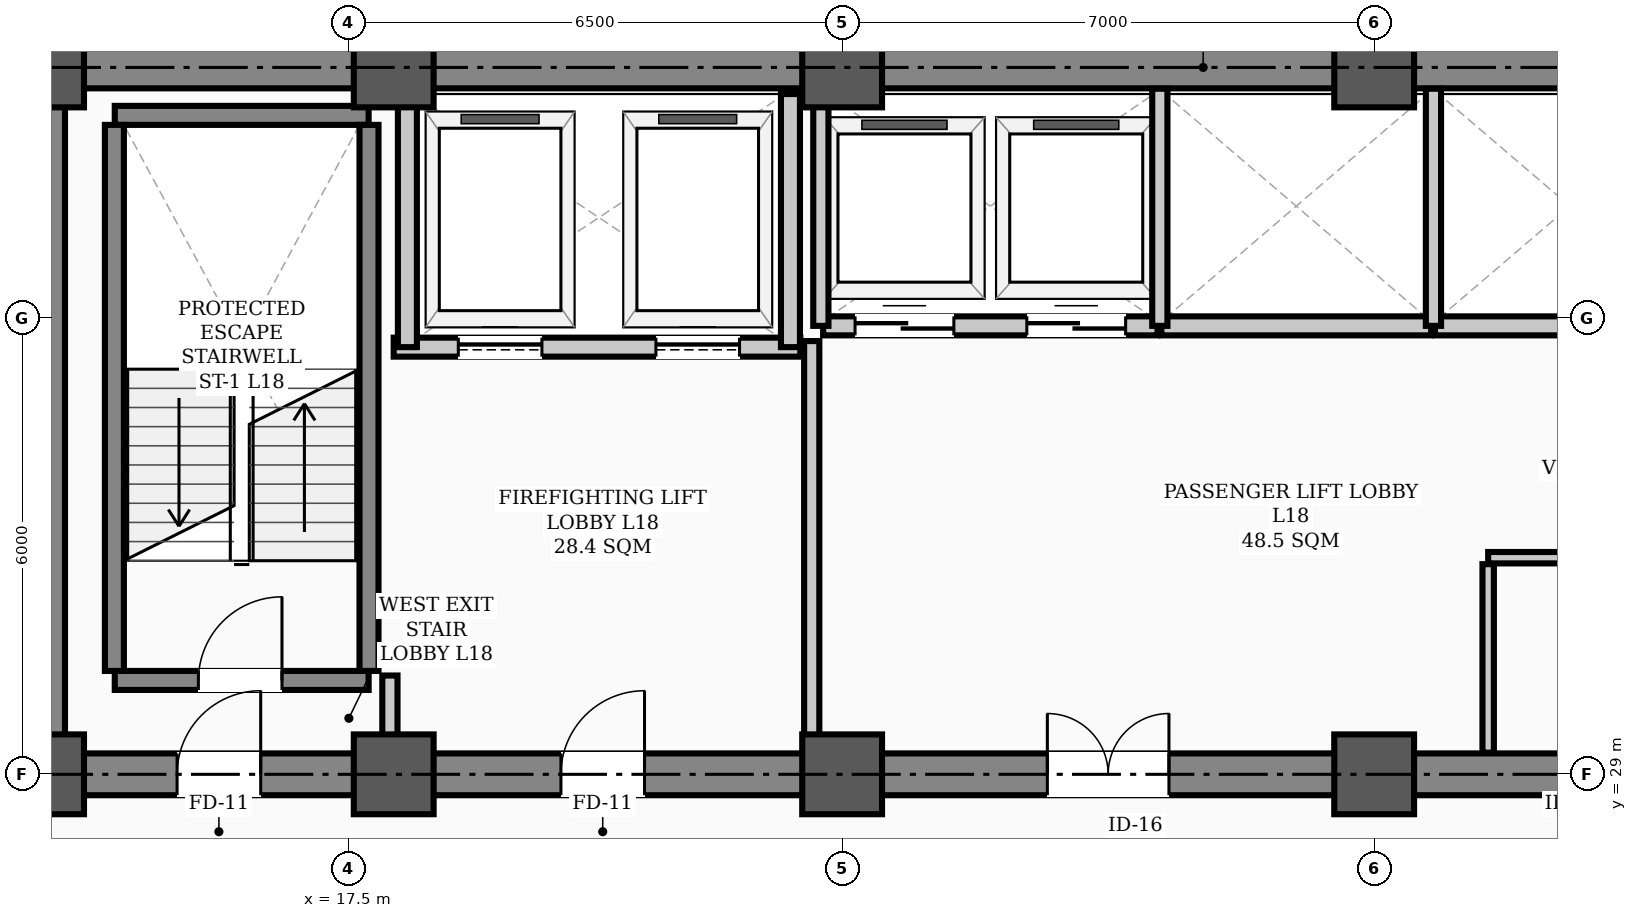
"""IFC4 building model, lengths in metres.
Left out: names, types, materials, properties, quantities, classifications, styles, units other than length and angle.
Written with IfcOpenShell. Run it as: python <this file> out.ifc"""

import sys

from ifc_helpers import new_model, si_unit, direction, frame, frame_2d, origin, origin_2d, place, context, subcontext, project, spatial, rectangle, hollow_rectangle, extrude, element, fill, save


model = new_model("IFC4")
c1 = context("Model", 3, precision=1e-05, world=origin(), true_north=direction((0.0, 1.0)))
c2 = subcontext(c1, "Body", "Model", "MODEL_VIEW")
j1 = project(units=[si_unit("LENGTHUNIT", "METRE"), si_unit("PLANEANGLEUNIT", "RADIAN")], contexts=[c1])
p1 = place(None, origin())
s1 = spatial("IfcSite", under=j1, at=p1, CompositionType="ELEMENT")
p2 = place(p1, origin())
s2 = spatial("IfcBuilding", under=s1, at=p2, CompositionType="ELEMENT")
p3 = place(p2, frame((0.0, 0.0, 73.3)))
s3 = spatial("IfcBuildingStorey", under=s2, at=p3, CompositionType="ELEMENT", Elevation=73.3)
for number, where, z_axis, x_axis in (
    (1, (13.5, 29.0, 0.0), (0.0, 0.0, 1.0), (1.0, 0.0, 0.0)),
    (2, (13.5, 38.3, 0.0), (0.0, 0.0, 1.0), (1.0, 0.0, 0.0)),
    (3, (18.1, 29.0, 0.0), (0.0, 0.0, 1.0), (1.0, 0.0, 0.0)),
    (4, (18.1, 38.3, 0.0), (0.0, 0.0, 1.0), (1.0, 0.0, 0.0)),
    (5, (24.0, 29.0, 0.0), (0.0, 0.0, 1.0), (1.0, 0.0, 0.0)),
    (6, (24.0, 38.3, 0.0), (0.0, 0.0, 1.0), (1.0, 0.0, 0.0)),
    (7, (31.0, 29.0, 0.0), (0.0, 0.0, 1.0), (1.0, 0.0, 0.0)),
    (8, (31.0, 38.3, 0.0), (0.0, 0.0, 1.0), (1.0, 0.0, 0.0)),
):
    element("IfcColumn", number, at=place(p3, frame(where, z_axis=z_axis, x_axis=x_axis)), inside=s3, PredefinedType="COLUMN", context=c2, shape_type="SweptSolid", body=[
        extrude(hollow_rectangle(XDim=1.05, YDim=1.05, WallThickness=0.038, InnerFilletRadius=0.019, OuterFilletRadius=0.057, at=origin_2d()), origin(), (0.0, 0.0, 1.0), 3.9),
    ])
p4 = place(p3, frame((13.5, 29.0, 0.0), z_axis=(0.0, 0.0, 1.0), x_axis=(1.0, 0.0, 0.0)))
e9 = element("IfcWall", 9, at=p4, inside=s3, PredefinedType="SHEAR", context=c2, shape_type="SweptSolid", body=[
    extrude(rectangle(XDim=30.5, YDim=0.55, at=frame_2d((15.25, 0.0))), origin(), (0.0, 0.0, 1.0), 3.72),
])
p5 = place(p4, frame((1.75, 0.0, 0.0)))
e10 = element("IfcOpeningElement", 10, at=p5, cuts=e9, PredefinedType="OPENING", context=c2, shape_type="SweptSolid", body=[
    extrude(rectangle(XDim=1.1, YDim=2.08, at=frame_2d((0.55, 1.04))), frame((0.0, 0.285, 0.0), z_axis=(0.0, -1.0, 0.0), x_axis=(1.0, 0.0, 0.0)), (0.0, 0.0, 1.0), 0.57),
])
p6 = place(p4, frame((26.7, 0.0, 0.0)))
e11 = element("IfcOpeningElement", 11, at=p6, cuts=e9, PredefinedType="OPENING", context=c2, shape_type="SweptSolid", body=[
    extrude(rectangle(XDim=1.1, YDim=2.08, at=frame_2d((0.55, 1.04))), frame((0.0, 0.285, 0.0), z_axis=(0.0, -1.0, 0.0), x_axis=(1.0, 0.0, 0.0)), (0.0, 0.0, 1.0), 0.57),
])
p7 = place(p4, frame((6.8, 0.0, 0.0)))
e12 = element("IfcOpeningElement", 12, at=p7, cuts=e9, PredefinedType="OPENING", context=c2, shape_type="SweptSolid", body=[
    extrude(rectangle(XDim=1.1, YDim=2.08, at=frame_2d((0.55, 1.04))), frame((0.0, 0.285, 0.0), z_axis=(0.0, -1.0, 0.0), x_axis=(1.0, 0.0, 0.0)), (0.0, 0.0, 1.0), 0.57),
])
p8 = place(p4, frame((13.2, 0.0, 0.0)))
e13 = element("IfcOpeningElement", 13, at=p8, cuts=e9, PredefinedType="OPENING", context=c2, shape_type="SweptSolid", body=[
    extrude(rectangle(XDim=1.6, YDim=2.08, at=frame_2d((0.8, 1.04))), frame((0.0, 0.285, 0.0), z_axis=(0.0, -1.0, 0.0), x_axis=(1.0, 0.0, 0.0)), (0.0, 0.0, 1.0), 0.57),
])
p9 = place(p4, frame((20.525, 0.0, 0.0)))
e14 = element("IfcOpeningElement", 14, at=p9, cuts=e9, PredefinedType="OPENING", context=c2, shape_type="SweptSolid", body=[
    extrude(rectangle(XDim=0.95, YDim=2.08, at=frame_2d((0.475, 1.04))), frame((0.0, 0.285, 0.0), z_axis=(0.0, -1.0, 0.0), x_axis=(1.0, 0.0, 0.0)), (0.0, 0.0, 1.0), 0.57),
])
p10 = place(p3, frame((13.5, 38.3, 0.0), z_axis=(0.0, 0.0, 1.0), x_axis=(1.0, 0.0, 0.0)))
e15 = element("IfcWall", 15, at=p10, inside=s3, PredefinedType="SHEAR", context=c2, shape_type="SweptSolid", body=[
    extrude(rectangle(XDim=30.5, YDim=0.55, at=frame_2d((15.25, 0.0))), origin(), (0.0, 0.0, 1.0), 3.72),
])
p11 = place(p3, frame((13.5, 29.35, 0.0), z_axis=(0.0, 0.0, 1.0), x_axis=(0.0, 1.0, 0.0)))
e16 = element("IfcWall", 16, at=p11, inside=s3, PredefinedType="SHEAR", context=c2, shape_type="SweptSolid", body=[
    extrude(rectangle(XDim=8.6, YDim=0.55, at=frame_2d((4.3, 0.0))), origin(), (0.0, 0.0, 1.0), 3.72),
])
p12 = place(p3, frame((14.43, 30.235, 0.0), z_axis=(0.0, 0.0, 1.0), x_axis=(1.0, 0.0, 0.0)))
e17 = element("IfcWall", 17, at=p12, inside=s3, PredefinedType="STANDARD", context=c2, shape_type="SweptSolid", body=[
    extrude(rectangle(XDim=3.34, YDim=0.25, at=frame_2d((1.67, 0.0))), origin(), (0.0, 0.0, 1.0), 3.72),
])
p13 = place(p12, frame((1.1, 0.0, 0.0)))
e18 = element("IfcOpeningElement", 18, at=p13, cuts=e17, PredefinedType="OPENING", context=c2, shape_type="SweptSolid", body=[
    extrude(rectangle(XDim=1.1, YDim=2.08, at=frame_2d((0.55, 1.04))), frame((0.0, 0.135, 0.0), z_axis=(0.0, -1.0, 0.0), x_axis=(1.0, 0.0, 0.0)), (0.0, 0.0, 1.0), 0.27),
])
p14 = place(p3, frame((14.43, 37.669, 0.0), z_axis=(0.0, 0.0, 1.0), x_axis=(1.0, 0.0, 0.0)))
e19 = element("IfcWall", 19, at=p14, inside=s3, PredefinedType="STANDARD", context=c2, shape_type="SweptSolid", body=[
    extrude(rectangle(XDim=3.34, YDim=0.25, at=frame_2d((1.67, 0.0))), origin(), (0.0, 0.0, 1.0), 3.72),
])
for number, where, z_axis, x_axis in (
    (20, (14.425, 30.36, 0.0), (0.0, 0.0, 1.0), (0.0, 1.0, 0.0)),
    (21, (17.775, 30.36, 0.0), (0.0, 0.0, 1.0), (0.0, 1.0, 0.0)),
):
    element("IfcWall", number, at=place(p3, frame(where, z_axis=z_axis, x_axis=x_axis)), inside=s3, PredefinedType="STANDARD", context=c2, shape_type="SweptSolid", body=[
        extrude(rectangle(XDim=7.184, YDim=0.25, at=frame_2d((3.592, 0.0))), origin(), (0.0, 0.0, 1.0), 3.72),
    ])
p15 = place(p3, frame((18.1, 34.62, 0.0), z_axis=(0.0, 0.0, 1.0), x_axis=(1.0, 0.0, 0.0)))
e22 = element("IfcWall", 22, at=p15, inside=s3, PredefinedType="STANDARD", context=c2, shape_type="SweptSolid", body=[
    extrude(rectangle(XDim=5.35, YDim=0.25, at=frame_2d((2.675, 0.0))), origin(), (0.0, 0.0, 1.0), 3.72),
])
p16 = place(p15, frame((0.85, 0.0, 0.0)))
e23 = element("IfcOpeningElement", 23, at=p16, cuts=e22, PredefinedType="OPENING", context=c2, shape_type="SweptSolid", body=[
    extrude(rectangle(XDim=1.1, YDim=2.08, at=frame_2d((0.55, 1.04))), frame((0.0, 0.135, 0.0), z_axis=(0.0, -1.0, 0.0), x_axis=(1.0, 0.0, 0.0)), (0.0, 0.0, 1.0), 0.27),
])
p17 = place(p15, frame((3.45, 0.0, 0.0)))
e24 = element("IfcOpeningElement", 24, at=p17, cuts=e22, PredefinedType="OPENING", context=c2, shape_type="SweptSolid", body=[
    extrude(rectangle(XDim=1.1, YDim=2.08, at=frame_2d((0.55, 1.04))), frame((0.0, 0.135, 0.0), z_axis=(0.0, -1.0, 0.0), x_axis=(1.0, 0.0, 0.0)), (0.0, 0.0, 1.0), 0.27),
])
for number, where, z_axis, x_axis in (
    (25, (18.28, 34.62, 0.0), (0.0, 0.0, 1.0), (0.0, 1.0, 0.0)),
    (26, (23.32, 34.62, 0.0), (0.0, 0.0, 1.0), (0.0, 1.0, 0.0)),
):
    element("IfcWall", number, at=place(p3, frame(where, z_axis=z_axis, x_axis=x_axis)), inside=s3, PredefinedType="STANDARD", context=c2, shape_type="SweptSolid", body=[
        extrude(rectangle(XDim=3.33, YDim=0.25, at=frame_2d((1.665, 0.0))), origin(), (0.0, 0.0, 1.0), 3.3),
    ])
p18 = place(p3, frame((23.75, 34.9, 0.0), z_axis=(0.0, 0.0, 1.0), x_axis=(1.0, 0.0, 0.0)))
e27 = element("IfcWall", 27, at=p18, inside=s3, PredefinedType="STANDARD", context=c2, shape_type="SweptSolid", body=[
    extrude(rectangle(XDim=4.4, YDim=0.25, at=frame_2d((2.2, 0.0))), origin(), (0.0, 0.0, 1.0), 3.72),
])
p19 = place(p18, frame((0.42, 0.0, 0.0)))
e28 = element("IfcOpeningElement", 28, at=p19, cuts=e27, PredefinedType="OPENING", context=c2, shape_type="SweptSolid", body=[
    extrude(rectangle(XDim=1.3, YDim=2.08, at=frame_2d((0.65, 1.04))), frame((0.0, 0.135, 0.0), z_axis=(0.0, -1.0, 0.0), x_axis=(1.0, 0.0, 0.0)), (0.0, 0.0, 1.0), 0.27),
])
p20 = place(p18, frame((2.68, 0.0, 0.0)))
e29 = element("IfcOpeningElement", 29, at=p20, cuts=e27, PredefinedType="OPENING", context=c2, shape_type="SweptSolid", body=[
    extrude(rectangle(XDim=1.3, YDim=2.08, at=frame_2d((0.65, 1.04))), frame((0.0, 0.135, 0.0), z_axis=(0.0, -1.0, 0.0), x_axis=(1.0, 0.0, 0.0)), (0.0, 0.0, 1.0), 0.27),
])
p21 = place(p3, frame((28.2, 34.9, 0.0), z_axis=(0.0, 0.0, 1.0), x_axis=(1.0, 0.0, 0.0)))
e30 = element("IfcWall", 30, at=p21, inside=s3, PredefinedType="STANDARD", context=c2, shape_type="SweptSolid", body=[
    extrude(rectangle(XDim=3.55, YDim=0.25, at=frame_2d((1.775, 0.0))), origin(), (0.0, 0.0, 1.0), 3.72),
])
p22 = place(p3, frame((31.8, 34.9, 0.0), z_axis=(0.0, 0.0, 1.0), x_axis=(1.0, 0.0, 0.0)))
e31 = element("IfcWall", 31, at=p22, inside=s3, PredefinedType="STANDARD", context=c2, shape_type="SweptSolid", body=[
    extrude(rectangle(XDim=3.6, YDim=0.25, at=frame_2d((1.8, 0.0))), origin(), (0.0, 0.0, 1.0), 3.72),
])
p23 = place(p3, frame((32.5, 31.85, 0.0), z_axis=(0.0, 0.0, 1.0), x_axis=(1.0, 0.0, 0.0)))
e32 = element("IfcWall", 32, at=p23, inside=s3, PredefinedType="PARTITIONING", context=c2, shape_type="SweptSolid", body=[
    extrude(rectangle(XDim=4.1, YDim=0.15, at=frame_2d((2.05, 0.0))), origin(), (0.0, 0.0, 1.0), 3.72),
])
p24 = place(p3, frame((18.05, 29.285, 0.0), z_axis=(0.0, 0.0, 1.0), x_axis=(0.0, 1.0, 0.0)))
e33 = element("IfcWall", 33, at=p24, inside=s3, PredefinedType="STANDARD", context=c2, shape_type="SweptSolid", body=[
    extrude(rectangle(XDim=1.015, YDim=0.2, at=frame_2d((0.508, 0.0))), origin(), (0.0, 0.0, 1.0), 3.3),
])
p25 = place(p3, frame((23.6, 29.285, 0.0), z_axis=(0.0, 0.0, 1.0), x_axis=(0.0, 1.0, 0.0)))
e34 = element("IfcWall", 34, at=p25, inside=s3, PredefinedType="STANDARD", context=c2, shape_type="SweptSolid", body=[
    extrude(rectangle(XDim=5.415, YDim=0.2, at=frame_2d((2.708, 0.0))), origin(), (0.0, 0.0, 1.0), 3.1),
])
p26 = place(p3, frame((32.5, 29.285, 0.0), z_axis=(0.0, 0.0, 1.0), x_axis=(0.0, 1.0, 0.0)))
e35 = element("IfcWall", 35, at=p26, inside=s3, PredefinedType="PARTITIONING", context=c2, shape_type="SweptSolid", body=[
    extrude(rectangle(XDim=2.48, YDim=0.15, at=frame_2d((1.24, 0.0))), origin(), (0.0, 0.0, 1.0), 3.3),
])
p27 = place(p3, frame((23.72, 34.9, 0.0), z_axis=(0.0, 0.0, 1.0), x_axis=(0.0, 1.0, 0.0)))
e36 = element("IfcWall", 36, at=p27, inside=s3, PredefinedType="STANDARD", context=c2, shape_type="SweptSolid", body=[
    extrude(rectangle(XDim=3.12, YDim=0.2, at=frame_2d((1.56, 0.0))), origin(), (0.0, 0.0, 1.0), 3.1),
])
for number, where, z_axis, x_axis in (
    (37, (28.18, 34.9, 0.0), (0.0, 0.0, 1.0), (0.0, 1.0, 0.0)),
    (38, (31.78, 34.9, 0.0), (0.0, 0.0, 1.0), (0.0, 1.0, 0.0)),
):
    element("IfcWall", number, at=place(p3, frame(where, z_axis=z_axis, x_axis=x_axis)), inside=s3, PredefinedType="STANDARD", context=c2, shape_type="SweptSolid", body=[
        extrude(rectangle(XDim=3.12, YDim=0.2, at=frame_2d((1.56, 0.0))), origin(), (0.0, 0.0, 1.0), 3.3),
    ])
p28 = place(p13, origin())
e39 = element("IfcDoor", 39, at=p28, inside=s3, OperationType="SINGLE_SWING_RIGHT", PredefinedType="DOOR", context=c2, shape_type="SweptSolid", body=[
    extrude(rectangle(XDim=1.1, YDim=2.08, at=frame_2d((0.55, 1.04))), frame((0.0, 0.025, 0.0), z_axis=(0.0, -1.0, 0.0), x_axis=(1.0, 0.0, 0.0)), (0.0, 0.0, 1.0), 0.05),
])
fill(e18, e39)
p29 = place(p5, origin())
e40 = element("IfcDoor", 40, at=p29, inside=s3, OperationType="SINGLE_SWING_RIGHT", PredefinedType="DOOR", context=c2, shape_type="SweptSolid", body=[
    extrude(rectangle(XDim=1.1, YDim=2.08, at=frame_2d((0.55, 1.04))), frame((0.0, 0.025, 0.0), z_axis=(0.0, -1.0, 0.0), x_axis=(1.0, 0.0, 0.0)), (0.0, 0.0, 1.0), 0.05),
])
fill(e10, e40)
p30 = place(p7, origin())
e41 = element("IfcDoor", 41, at=p30, inside=s3, OperationType="SINGLE_SWING_RIGHT", PredefinedType="DOOR", context=c2, shape_type="SweptSolid", body=[
    extrude(rectangle(XDim=1.1, YDim=2.08, at=frame_2d((0.55, 1.04))), frame((0.0, 0.025, 0.0), z_axis=(0.0, -1.0, 0.0), x_axis=(1.0, 0.0, 0.0)), (0.0, 0.0, 1.0), 0.05),
])
fill(e12, e41)
p31 = place(p8, origin())
e42 = element("IfcDoor", 42, at=p31, inside=s3, OperationType="DOUBLE_DOOR_SINGLE_SWING", PredefinedType="DOOR", context=c2, shape_type="SweptSolid", body=[
    extrude(rectangle(XDim=1.6, YDim=2.08, at=frame_2d((0.8, 1.04))), frame((0.0, 0.025, 0.0), z_axis=(0.0, -1.0, 0.0), x_axis=(1.0, 0.0, 0.0)), (0.0, 0.0, 1.0), 0.05),
])
fill(e13, e42)
p32 = place(p16, origin())
e43 = element("IfcDoor", 43, at=p32, inside=s3, OperationType="SLIDING_TO_LEFT", PredefinedType="DOOR", context=c2, shape_type="SweptSolid", body=[
    extrude(rectangle(XDim=1.1, YDim=2.08, at=frame_2d((0.55, 1.04))), frame((0.0, 0.025, 0.0), z_axis=(0.0, -1.0, 0.0), x_axis=(1.0, 0.0, 0.0)), (0.0, 0.0, 1.0), 0.05),
])
fill(e23, e43)
p33 = place(p17, origin())
e44 = element("IfcDoor", 44, at=p33, inside=s3, OperationType="SLIDING_TO_LEFT", PredefinedType="DOOR", context=c2, shape_type="SweptSolid", body=[
    extrude(rectangle(XDim=1.1, YDim=2.08, at=frame_2d((0.55, 1.04))), frame((0.0, 0.025, 0.0), z_axis=(0.0, -1.0, 0.0), x_axis=(1.0, 0.0, 0.0)), (0.0, 0.0, 1.0), 0.05),
])
fill(e24, e44)
p34 = place(p19, origin())
e45 = element("IfcDoor", 45, at=p34, inside=s3, OperationType="DOUBLE_DOOR_SLIDING", PredefinedType="DOOR", context=c2, shape_type="SweptSolid", body=[
    extrude(rectangle(XDim=1.3, YDim=2.08, at=frame_2d((0.65, 1.04))), frame((0.0, 0.025, 0.0), z_axis=(0.0, -1.0, 0.0), x_axis=(1.0, 0.0, 0.0)), (0.0, 0.0, 1.0), 0.05),
])
fill(e28, e45)
p35 = place(p20, origin())
e46 = element("IfcDoor", 46, at=p35, inside=s3, OperationType="DOUBLE_DOOR_SLIDING", PredefinedType="DOOR", context=c2, shape_type="SweptSolid", body=[
    extrude(rectangle(XDim=1.3, YDim=2.08, at=frame_2d((0.65, 1.04))), frame((0.0, 0.025, 0.0), z_axis=(0.0, -1.0, 0.0), x_axis=(1.0, 0.0, 0.0)), (0.0, 0.0, 1.0), 0.05),
])
fill(e29, e46)
save(model, sys.argv[1])
